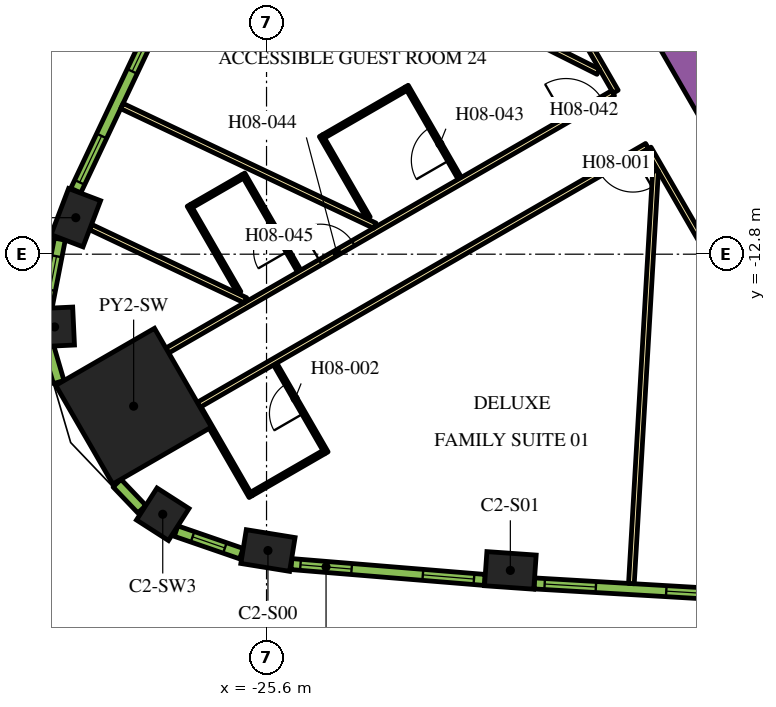
"""IFC4 building model, lengths in metres.
Left out: names, types, materials, properties, quantities, classifications, styles, units other than length and angle.
Written with IfcOpenShell. Run it as: python <this file> out.ifc"""

import sys

from ifc_helpers import new_model, si_unit, direction, frame, frame_2d, origin, origin_2d, place, context, subcontext, project, spatial, rectangle, extrude, element, fill, save


model = new_model("IFC4")
c1 = context("Model", 3, precision=1e-05, world=origin(), true_north=direction((0.0, 1.0)))
c2 = subcontext(c1, "Body", "Model", "MODEL_VIEW")
j1 = project(units=[si_unit("LENGTHUNIT", "METRE"), si_unit("PLANEANGLEUNIT", "RADIAN")], contexts=[c1])
p1 = place(None, origin())
s1 = spatial("IfcSite", under=j1, at=p1, CompositionType="ELEMENT")
p2 = place(p1, origin())
s2 = spatial("IfcBuilding", under=s1, at=p2, CompositionType="ELEMENT")
p3 = place(p2, frame((0.0, 0.0, 107.1)))
s3 = spatial("IfcBuildingStorey", under=s2, at=p3, CompositionType="ELEMENT", Elevation=107.1)
p4 = place(p3, frame((-29.097, -16.799, 0.0), z_axis=(0.0, 0.0, 1.0), x_axis=(-0.866025403784, -0.5, 0.0)))
e1 = element("IfcColumn", 1, at=p4, inside=s3, PredefinedType="COLUMN", context=c2, shape_type="SweptSolid", body=[
    extrude(rectangle(XDim=3.0, YDim=3.0, at=origin_2d()), origin(), (0.0, 0.0, 1.0), 3.9),
])
for number, where, z_axis, x_axis in (
    (2, (-25.563, -20.597, 0.0), (0.0, 0.0, 1.0), (0.987, -0.159, 0.0)),
    (3, (-19.184, -21.12, 0.0), (0.0, 0.0, 1.0), (0.998, -0.07, 0.0)),
    (4, (-30.619, -11.839, 0.0), (0.0, 0.0, 1.0), (-0.355, -0.935, 0.0)),
):
    element("IfcColumn", number, at=place(p3, frame(where, z_axis=z_axis, x_axis=x_axis)), inside=s3, PredefinedType="COLUMN", context=c2, shape_type="SweptSolid", body=[
        extrude(rectangle(XDim=1.3, YDim=0.9, at=origin_2d()), origin(), (0.0, 0.0, 1.0), 3.9),
    ])
for number, where, z_axis, x_axis in (
    (5, (-31.177, -14.714, 0.0), (0.0, 0.0, 1.0), (0.047, -0.999, 0.0)),
    (6, (-28.331, -19.643, 0.0), (0.0, 0.0, 1.0), (0.842, -0.54, 0.0)),
):
    element("IfcColumn", number, at=place(p3, frame(where, z_axis=z_axis, x_axis=x_axis)), inside=s3, PredefinedType="COLUMN", context=c2, shape_type="SweptSolid", body=[
        extrude(rectangle(XDim=1.0, YDim=1.0, at=origin_2d()), origin(), (0.0, 0.0, 1.0), 3.9),
    ])
p5 = place(p3, frame((-12.134, -11.883, 0.0), z_axis=(0.0, 0.0, 1.0), x_axis=(-0.500005339912, 0.866022320763, 0.0)))
e7 = element("IfcWall", 7, at=p5, inside=s3, PredefinedType="SOLIDWALL", context=c2, shape_type="SweptSolid", body=[
    extrude(rectangle(XDim=9.488, YDim=0.9, at=frame_2d((4.744, 0.0))), origin(), (0.0, 0.0, 1.0), 3.9),
])
p6 = place(p3, frame((-12.885, -9.431, 0.0), z_axis=(0.0, 0.0, 1.0), x_axis=(-0.500020560727, 0.866013532718, 0.0)))
e8 = element("IfcWall", 8, at=p6, inside=s3, PredefinedType="SOLIDWALL", context=c2, shape_type="SweptSolid", body=[
    extrude(rectangle(XDim=3.45, YDim=0.25, at=frame_2d((1.725, 0.0))), origin(), (0.0, 0.0, 1.0), 3.9),
])
p7 = place(p3, frame((-16.412, -8.523, 0.0), z_axis=(0.0, 0.0, 1.0), x_axis=(-0.500001929737, 0.866024289647, 0.0)))
e9 = element("IfcWall", 9, at=p7, inside=s3, PredefinedType="PARTITIONING", context=c2, shape_type="SweptSolid", body=[
    extrude(rectangle(XDim=5.268, YDim=0.15, at=frame_2d((2.634, 0.0))), origin(), (0.0, 0.0, 1.0), 2.75),
])
p8 = place(p3, frame((-28.211, -15.335, 0.0), z_axis=(0.0, 0.0, 1.0), x_axis=(0.866025884867, 0.49999916674, 0.0)))
e10 = element("IfcWall", 10, at=p8, inside=s3, PredefinedType="PARTITIONING", context=c2, shape_type="SweptSolid", body=[
    extrude(rectangle(XDim=13.543, YDim=0.15, at=frame_2d((6.772, 0.0))), origin(), (0.0, 0.0, 1.0), 2.75),
])
p9 = place(p8, frame((12.114, 0.0, 0.0)))
e11 = element("IfcOpeningElement", 11, at=p9, cuts=e10, PredefinedType="OPENING", context=c2, shape_type="SweptSolid", body=[
    extrude(rectangle(XDim=1.1, YDim=2.1, at=frame_2d((0.55, 1.05))), frame((0.0, 0.085, 0.0), z_axis=(0.0, -1.0, 0.0), x_axis=(1.0, 0.0, 0.0)), (0.0, 0.0, 1.0), 0.17),
])
p10 = place(p8, frame((4.65, 0.0, 0.0)))
e12 = element("IfcOpeningElement", 12, at=p10, cuts=e10, PredefinedType="OPENING", context=c2, shape_type="SweptSolid", body=[
    extrude(rectangle(XDim=1.0, YDim=2.1, at=frame_2d((0.5, 1.05))), frame((0.0, 0.085, 0.0), z_axis=(0.0, -1.0, 0.0), x_axis=(1.0, 0.0, 0.0)), (0.0, 0.0, 1.0), 0.17),
])
p11 = place(p3, frame((-15.587, -9.952, 0.0), z_axis=(0.0, 0.0, 1.0), x_axis=(-0.866017869832, -0.500013048961, 0.0)))
e13 = element("IfcWall", 13, at=p11, inside=s3, PredefinedType="PARTITIONING", context=c2, shape_type="SweptSolid", body=[
    extrude(rectangle(XDim=13.624, YDim=0.15, at=frame_2d((6.812, 0.0))), origin(), (0.0, 0.0, 1.0), 2.75),
])
p12 = place(p11, frame((0.427, 0.0, 0.0)))
e14 = element("IfcOpeningElement", 14, at=p12, cuts=e13, PredefinedType="OPENING", context=c2, shape_type="SweptSolid", body=[
    extrude(rectangle(XDim=1.0, YDim=2.1, at=frame_2d((0.5, 1.05))), frame((0.0, 0.085, 0.0), z_axis=(0.0, -1.0, 0.0), x_axis=(1.0, 0.0, 0.0)), (0.0, 0.0, 1.0), 0.17),
])
p13 = place(p3, frame((-12.918, -14.575, 0.0), z_axis=(0.0, 0.0, 1.0), x_axis=(-0.500009150678, 0.866020120573, 0.0)))
e15 = element("IfcWall", 15, at=p13, inside=s3, PredefinedType="PARTITIONING", context=c2, shape_type="SweptSolid", body=[
    extrude(rectangle(XDim=5.258, YDim=0.15, at=frame_2d((2.629, 0.0))), origin(), (0.0, 0.0, 1.0), 2.75),
])
p14 = place(p3, frame((-30.231, -12.085, 0.0), z_axis=(0.0, 0.0, 1.0), x_axis=(0.904001132572, -0.427530060122, 0.0)))
e16 = element("IfcWall", 16, at=p14, inside=s3, PredefinedType="PARTITIONING", context=c2, shape_type="SweptSolid", body=[
    extrude(rectangle(XDim=4.51, YDim=0.15, at=frame_2d((2.255, 0.0))), origin(), (0.0, 0.0, 1.0), 2.75),
])
p15 = place(p3, frame((-29.406, -8.901, 0.0), z_axis=(0.0, 0.0, 1.0), x_axis=(0.904002363742, -0.427527456836, 0.0)))
e17 = element("IfcWall", 17, at=p15, inside=s3, PredefinedType="PARTITIONING", context=c2, shape_type="SweptSolid", body=[
    extrude(rectangle(XDim=7.362, YDim=0.15, at=frame_2d((3.681, 0.0))), origin(), (0.0, 0.0, 1.0), 2.75),
])
p16 = place(p3, frame((-26.591, -3.122, 0.0), z_axis=(0.0, 0.0, 1.0), x_axis=(0.893766213273, -0.448533115847, 0.0)))
e18 = element("IfcWall", 18, at=p16, inside=s3, PredefinedType="PARTITIONING", context=c2, shape_type="SweptSolid", body=[
    extrude(rectangle(XDim=10.875, YDim=0.15, at=frame_2d((5.438, 0.0))), origin(), (0.0, 0.0, 1.0), 2.75),
])
p17 = place(p3, frame((-15.999, -21.467, 0.0), z_axis=(0.0, 0.0, 1.0), x_axis=(0.058411453297, 0.998292593443, 0.0)))
e19 = element("IfcWall", 19, at=p17, inside=s3, PredefinedType="PARTITIONING", context=c2, shape_type="SweptSolid", body=[
    extrude(rectangle(XDim=10.875, YDim=0.15, at=frame_2d((5.438, 0.0))), origin(), (0.0, 0.0, 1.0), 2.75),
])
p18 = place(p3, frame((-24.024, -18.027, 0.0), z_axis=(0.0, 0.0, 1.0), x_axis=(-0.4999416173, 0.866059108428, 0.0)))
e20 = element("IfcWall", 20, at=p18, inside=s3, PredefinedType="PARTITIONING", context=c2, shape_type="SweptSolid", body=[
    extrude(rectangle(XDim=2.7, YDim=0.1, at=frame_2d((1.35, 0.0))), origin(), (0.0, 0.0, 1.0), 2.75),
])
p19 = place(p18, frame((1.2, 0.0, 0.0)))
e21 = element("IfcOpeningElement", 21, at=p19, cuts=e20, PredefinedType="OPENING", context=c2, shape_type="SweptSolid", body=[
    extrude(rectangle(XDim=0.9, YDim=2.1, at=frame_2d((0.45, 1.05))), frame((0.0, 0.06, 0.0), z_axis=(0.0, -1.0, 0.0), x_axis=(1.0, 0.0, 0.0)), (0.0, 0.0, 1.0), 0.12),
])
p20 = place(p3, frame((-24.092, -18.009, 0.0), z_axis=(0.0, 0.0, 1.0), x_axis=(-0.866083962871, -0.499898558967, 0.0)))
e22 = element("IfcWall", 22, at=p20, inside=s3, PredefinedType="PARTITIONING", context=c2, shape_type="SweptSolid", body=[
    extrude(rectangle(XDim=2.2, YDim=0.1, at=frame_2d((1.1, 0.0))), origin(), (0.0, 0.0, 1.0), 2.75),
])
p21 = place(p3, frame((-27.365, -16.839, 0.0), z_axis=(0.0, 0.0, 1.0), x_axis=(0.50000943426, -0.866019956843, 0.0)))
e23 = element("IfcWall", 23, at=p21, inside=s3, PredefinedType="PARTITIONING", context=c2, shape_type="SweptSolid", body=[
    extrude(rectangle(XDim=2.7, YDim=0.1, at=frame_2d((1.35, 0.0))), origin(), (0.0, 0.0, 1.0), 2.75),
])
p22 = place(p3, frame((-20.515, -10.805, 0.0), z_axis=(0.0, 0.0, 1.0), x_axis=(-0.49994636267, 0.866056369097, 0.0)))
e24 = element("IfcWall", 24, at=p22, inside=s3, PredefinedType="PARTITIONING", context=c2, shape_type="SweptSolid", body=[
    extrude(rectangle(XDim=2.8, YDim=0.1, at=frame_2d((1.4, 0.0))), origin(), (0.0, 0.0, 1.0), 2.75),
])
p23 = place(p22, frame((0.55, 0.0, 0.0)))
e25 = element("IfcOpeningElement", 25, at=p23, cuts=e24, PredefinedType="OPENING", context=c2, shape_type="SweptSolid", body=[
    extrude(rectangle(XDim=1.0, YDim=2.1, at=frame_2d((0.5, 1.05))), frame((0.0, 0.06, 0.0), z_axis=(0.0, -1.0, 0.0), x_axis=(1.0, 0.0, 0.0)), (0.0, 0.0, 1.0), 0.12),
])
for number, where, z_axis, x_axis in (
    (26, (-21.933, -8.448, 0.0), (0.0, 0.0, 1.0), (-0.866, -0.5, 0.0)),
    (27, (-22.916, -11.845, 0.0), (0.0, 0.0, 1.0), (-0.5, 0.866, 0.0)),
):
    element("IfcWall", number, at=place(p3, frame(where, z_axis=z_axis, x_axis=x_axis)), inside=s3, PredefinedType="PARTITIONING", context=c2, shape_type="SweptSolid", body=[
        extrude(rectangle(XDim=2.5, YDim=0.1, at=frame_2d((1.25, 0.0))), origin(), (0.0, 0.0, 1.0), 2.75),
    ])
p24 = place(p3, frame((-24.74, -13.244, 0.0), z_axis=(0.0, 0.0, 1.0), x_axis=(-0.500037662692, 0.866003658127, 0.0)))
e28 = element("IfcWall", 28, at=p24, inside=s3, PredefinedType="PARTITIONING", context=c2, shape_type="SweptSolid", body=[
    extrude(rectangle(XDim=2.95, YDim=0.1, at=frame_2d((1.475, 0.0))), origin(), (0.0, 0.0, 1.0), 2.75),
])
p25 = place(p24, frame((0.6, 0.0, 0.0)))
e29 = element("IfcOpeningElement", 29, at=p25, cuts=e28, PredefinedType="OPENING", context=c2, shape_type="SweptSolid", body=[
    extrude(rectangle(XDim=0.9, YDim=2.1, at=frame_2d((0.45, 1.05))), frame((0.0, 0.06, 0.0), z_axis=(0.0, -1.0, 0.0), x_axis=(1.0, 0.0, 0.0)), (0.0, 0.0, 1.0), 0.12),
])
p26 = place(p3, frame((-26.233, -10.758, 0.0), z_axis=(0.0, 0.0, 1.0), x_axis=(-0.866043940782, -0.499967891604, 0.0)))
e30 = element("IfcWall", 30, at=p26, inside=s3, PredefinedType="PARTITIONING", context=c2, shape_type="SweptSolid", body=[
    extrude(rectangle(XDim=1.55, YDim=0.1, at=frame_2d((0.775, 0.0))), origin(), (0.0, 0.0, 1.0), 2.75),
])
p27 = place(p3, frame((-26.319, -13.81, 0.0), z_axis=(0.0, 0.0, 1.0), x_axis=(-0.499953715521, 0.866052124492, 0.0)))
e31 = element("IfcWall", 31, at=p27, inside=s3, PredefinedType="PARTITIONING", context=c2, shape_type="SweptSolid", body=[
    extrude(rectangle(XDim=2.65, YDim=0.1, at=frame_2d((1.325, 0.0))), origin(), (0.0, 0.0, 1.0), 2.75),
])
p28 = place(p3, frame((-24.946, -20.954, 0.0), z_axis=(0.0, 0.0, 1.0), x_axis=(0.99665273362, -0.081751627308, 0.0)))
e32 = element("IfcWall", 32, at=p28, inside=s3, PredefinedType="SOLIDWALL", context=c2, shape_type="SweptSolid", body=[
    extrude(rectangle(XDim=5.107, YDim=0.29, at=frame_2d((2.553, 0.0))), origin(), (0.0, 0.0, 1.0), 3.65),
])
p29 = place(p28, frame((0.24, 0.0, 0.9)))
e33 = element("IfcOpeningElement", 33, at=p29, cuts=e32, PredefinedType="OPENING", context=c2, shape_type="SweptSolid", body=[
    extrude(rectangle(XDim=1.35, YDim=2.15, at=frame_2d((0.675, 1.075))), frame((0.0, 0.155, 0.0), z_axis=(0.0, -1.0, 0.0), x_axis=(1.0, 0.0, 0.0)), (0.0, 0.0, 1.0), 0.31),
])
p30 = place(p28, frame((3.471, 0.0, 0.9)))
e34 = element("IfcOpeningElement", 34, at=p30, cuts=e32, PredefinedType="OPENING", context=c2, shape_type="SweptSolid", body=[
    extrude(rectangle(XDim=1.35, YDim=2.15, at=frame_2d((0.675, 1.075))), frame((0.0, 0.155, 0.0), z_axis=(0.0, -1.0, 0.0), x_axis=(1.0, 0.0, 0.0)), (0.0, 0.0, 1.0), 0.31),
])
p31 = place(p3, frame((-18.553, -21.463, 0.0), z_axis=(0.0, 0.0, 1.0), x_axis=(0.998290511436, -0.058447025388, 0.0)))
e35 = element("IfcWall", 35, at=p31, inside=s3, PredefinedType="SOLIDWALL", context=c2, shape_type="SweptSolid", body=[
    extrude(rectangle(XDim=5.1, YDim=0.29, at=frame_2d((2.55, 0.0))), origin(), (0.0, 0.0, 1.0), 3.65),
])
p32 = place(p31, frame((0.273, 0.0, 0.9)))
e36 = element("IfcOpeningElement", 36, at=p32, cuts=e35, PredefinedType="OPENING", context=c2, shape_type="SweptSolid", body=[
    extrude(rectangle(XDim=1.35, YDim=2.15, at=frame_2d((0.675, 1.075))), frame((0.0, 0.155, 0.0), z_axis=(0.0, -1.0, 0.0), x_axis=(1.0, 0.0, 0.0)), (0.0, 0.0, 1.0), 0.31),
])
p33 = place(p31, frame((3.478, 0.0, 0.9)))
e37 = element("IfcOpeningElement", 37, at=p33, cuts=e35, PredefinedType="OPENING", context=c2, shape_type="SweptSolid", body=[
    extrude(rectangle(XDim=1.35, YDim=2.15, at=frame_2d((0.675, 1.075))), frame((0.0, 0.155, 0.0), z_axis=(0.0, -1.0, 0.0), x_axis=(1.0, 0.0, 0.0)), (0.0, 0.0, 1.0), 0.31),
])
p34 = place(p3, frame((-28.436, -6.511, 0.0), z_axis=(0.0, 0.0, 1.0), x_axis=(-0.427543726596, -0.903994669148, 0.0)))
e38 = element("IfcWall", 38, at=p34, inside=s3, PredefinedType="SOLIDWALL", context=c2, shape_type="SweptSolid", body=[
    extrude(rectangle(XDim=5.107, YDim=0.29, at=frame_2d((2.553, 0.0))), origin(), (0.0, 0.0, 1.0), 3.65),
])
p35 = place(p34, frame((0.285, 0.0, 0.9)))
e39 = element("IfcOpeningElement", 39, at=p35, cuts=e38, PredefinedType="OPENING", context=c2, shape_type="SweptSolid", body=[
    extrude(rectangle(XDim=1.35, YDim=2.15, at=frame_2d((0.675, 1.075))), frame((0.0, 0.155, 0.0), z_axis=(0.0, -1.0, 0.0), x_axis=(1.0, 0.0, 0.0)), (0.0, 0.0, 1.0), 0.31),
])
p36 = place(p34, frame((3.516, 0.0, 0.9)))
e40 = element("IfcOpeningElement", 40, at=p36, cuts=e38, PredefinedType="OPENING", context=c2, shape_type="SweptSolid", body=[
    extrude(rectangle(XDim=1.35, YDim=2.15, at=frame_2d((0.675, 1.075))), frame((0.0, 0.155, 0.0), z_axis=(0.0, -1.0, 0.0), x_axis=(1.0, 0.0, 0.0)), (0.0, 0.0, 1.0), 0.31),
])
p37 = place(p3, frame((-31.039, -12.403, 0.0), z_axis=(0.0, 0.0, 1.0), x_axis=(-0.190409913989, -0.981704672829, 0.0)))
e41 = element("IfcWall", 41, at=p37, inside=s3, PredefinedType="SOLIDWALL", context=c2, shape_type="SweptSolid", body=[
    extrude(rectangle(XDim=1.819, YDim=0.29, at=frame_2d((0.91, 0.0))), origin(), (0.0, 0.0, 1.0), 3.65),
])
p38 = place(p37, frame((0.46, 0.0, 0.9)))
e42 = element("IfcOpeningElement", 42, at=p38, cuts=e41, PredefinedType="OPENING", context=c2, shape_type="SweptSolid", body=[
    extrude(rectangle(XDim=0.9, YDim=2.15, at=frame_2d((0.45, 1.075))), frame((0.0, 0.155, 0.0), z_axis=(0.0, -1.0, 0.0), x_axis=(1.0, 0.0, 0.0)), (0.0, 0.0, 1.0), 0.31),
])
p39 = place(p3, frame((-31.336, -15.256, 0.0), z_axis=(0.0, 0.0, 1.0), x_axis=(0.281454582132, -0.95957455062, 0.0)))
e43 = element("IfcWall", 43, at=p39, inside=s3, PredefinedType="SOLIDWALL", context=c2, shape_type="SweptSolid", body=[
    extrude(rectangle(XDim=0.947, YDim=0.29, at=frame_2d((0.474, 0.0))), origin(), (0.0, 0.0, 1.0), 3.65),
])
p40 = place(p3, frame((-29.534, -18.824, 0.0), z_axis=(0.0, 0.0, 1.0), x_axis=(0.690414427296, -0.723414071319, 0.0)))
e44 = element("IfcWall", 44, at=p40, inside=s3, PredefinedType="SOLIDWALL", context=c2, shape_type="SweptSolid", body=[
    extrude(rectangle(XDim=0.947, YDim=0.29, at=frame_2d((0.474, 0.0))), origin(), (0.0, 0.0, 1.0), 3.65),
])
p41 = place(p3, frame((-27.981, -20.086, 0.0), z_axis=(0.0, 0.0, 1.0), x_axis=(0.945385815453, -0.325953462844, 0.0)))
e45 = element("IfcWall", 45, at=p41, inside=s3, PredefinedType="SOLIDWALL", context=c2, shape_type="SweptSolid", body=[
    extrude(rectangle(XDim=1.819, YDim=0.29, at=frame_2d((0.91, 0.0))), origin(), (0.0, 0.0, 1.0), 3.65),
])
p42 = place(p41, frame((0.46, 0.0, 0.9)))
e46 = element("IfcOpeningElement", 46, at=p42, cuts=e45, PredefinedType="OPENING", context=c2, shape_type="SweptSolid", body=[
    extrude(rectangle(XDim=0.9, YDim=2.15, at=frame_2d((0.45, 1.075))), frame((0.0, 0.155, 0.0), z_axis=(0.0, -1.0, 0.0), x_axis=(1.0, 0.0, 0.0)), (0.0, 0.0, 1.0), 0.31),
])
p43 = place(p12, origin())
e47 = element("IfcDoor", 47, at=p43, inside=s3, OperationType="SINGLE_SWING_LEFT", PredefinedType="DOOR", context=c2, shape_type="SweptSolid", body=[
    extrude(rectangle(XDim=1.0, YDim=2.1, at=frame_2d((0.5, 1.05))), frame((0.0, 0.025, 0.0), z_axis=(0.0, -1.0, 0.0), x_axis=(1.0, 0.0, 0.0)), (0.0, 0.0, 1.0), 0.05),
])
fill(e14, e47)
p44 = place(p19, origin())
e48 = element("IfcDoor", 48, at=p44, inside=s3, OperationType="SINGLE_SWING_LEFT", PredefinedType="DOOR", context=c2, shape_type="SweptSolid", body=[
    extrude(rectangle(XDim=0.9, YDim=2.1, at=frame_2d((0.45, 1.05))), frame((0.0, 0.025, 0.0), z_axis=(0.0, -1.0, 0.0), x_axis=(1.0, 0.0, 0.0)), (0.0, 0.0, 1.0), 0.05),
])
fill(e21, e48)
p45 = place(p9, origin())
e49 = element("IfcDoor", 49, at=p45, inside=s3, OperationType="SINGLE_SWING_RIGHT", PredefinedType="DOOR", context=c2, shape_type="SweptSolid", body=[
    extrude(rectangle(XDim=1.1, YDim=2.1, at=frame_2d((0.55, 1.05))), frame((0.0, 0.025, 0.0), z_axis=(0.0, -1.0, 0.0), x_axis=(1.0, 0.0, 0.0)), (0.0, 0.0, 1.0), 0.05),
])
fill(e11, e49)
p46 = place(p23, origin())
e50 = element("IfcDoor", 50, at=p46, inside=s3, OperationType="SINGLE_SWING_RIGHT", PredefinedType="DOOR", context=c2, shape_type="SweptSolid", body=[
    extrude(rectangle(XDim=1.0, YDim=2.1, at=frame_2d((0.5, 1.05))), frame((0.0, 0.025, 0.0), z_axis=(0.0, -1.0, 0.0), x_axis=(1.0, 0.0, 0.0)), (0.0, 0.0, 1.0), 0.05),
])
fill(e25, e50)
p47 = place(p10, origin())
e51 = element("IfcDoor", 51, at=p47, inside=s3, OperationType="SINGLE_SWING_RIGHT", PredefinedType="DOOR", context=c2, shape_type="SweptSolid", body=[
    extrude(rectangle(XDim=1.0, YDim=2.1, at=frame_2d((0.5, 1.05))), frame((0.0, 0.025, 0.0), z_axis=(0.0, -1.0, 0.0), x_axis=(1.0, 0.0, 0.0)), (0.0, 0.0, 1.0), 0.05),
])
fill(e12, e51)
p48 = place(p25, origin())
e52 = element("IfcDoor", 52, at=p48, inside=s3, OperationType="SINGLE_SWING_LEFT", PredefinedType="DOOR", context=c2, shape_type="SweptSolid", body=[
    extrude(rectangle(XDim=0.9, YDim=2.1, at=frame_2d((0.45, 1.05))), frame((0.0, 0.025, 0.0), z_axis=(0.0, -1.0, 0.0), x_axis=(1.0, 0.0, 0.0)), (0.0, 0.0, 1.0), 0.05),
])
fill(e29, e52)
p49 = place(p29, origin())
e53 = element("IfcWindow", 53, at=p49, inside=s3, PartitioningType="DOUBLE_PANEL_VERTICAL", PredefinedType="WINDOW", context=c2, shape_type="SweptSolid", body=[
    extrude(rectangle(XDim=1.35, YDim=2.15, at=frame_2d((0.675, 1.075))), frame((0.0, 0.015, 0.0), z_axis=(0.0, -1.0, 0.0), x_axis=(1.0, 0.0, 0.0)), (0.0, 0.0, 1.0), 0.06),
])
fill(e33, e53)
p50 = place(p30, origin())
e54 = element("IfcWindow", 54, at=p50, inside=s3, PartitioningType="DOUBLE_PANEL_VERTICAL", PredefinedType="WINDOW", context=c2, shape_type="SweptSolid", body=[
    extrude(rectangle(XDim=1.35, YDim=2.15, at=frame_2d((0.675, 1.075))), frame((0.0, 0.015, 0.0), z_axis=(0.0, -1.0, 0.0), x_axis=(1.0, 0.0, 0.0)), (0.0, 0.0, 1.0), 0.06),
])
fill(e34, e54)
p51 = place(p32, origin())
e55 = element("IfcWindow", 55, at=p51, inside=s3, PartitioningType="DOUBLE_PANEL_VERTICAL", PredefinedType="WINDOW", context=c2, shape_type="SweptSolid", body=[
    extrude(rectangle(XDim=1.35, YDim=2.15, at=frame_2d((0.675, 1.075))), frame((0.0, 0.015, 0.0), z_axis=(0.0, -1.0, 0.0), x_axis=(1.0, 0.0, 0.0)), (0.0, 0.0, 1.0), 0.06),
])
fill(e36, e55)
p52 = place(p33, origin())
e56 = element("IfcWindow", 56, at=p52, inside=s3, PartitioningType="DOUBLE_PANEL_VERTICAL", PredefinedType="WINDOW", context=c2, shape_type="SweptSolid", body=[
    extrude(rectangle(XDim=1.35, YDim=2.15, at=frame_2d((0.675, 1.075))), frame((0.0, 0.015, 0.0), z_axis=(0.0, -1.0, 0.0), x_axis=(1.0, 0.0, 0.0)), (0.0, 0.0, 1.0), 0.06),
])
fill(e37, e56)
p53 = place(p35, origin())
e57 = element("IfcWindow", 57, at=p53, inside=s3, PartitioningType="DOUBLE_PANEL_VERTICAL", PredefinedType="WINDOW", context=c2, shape_type="SweptSolid", body=[
    extrude(rectangle(XDim=1.35, YDim=2.15, at=frame_2d((0.675, 1.075))), frame((0.0, 0.015, 0.0), z_axis=(0.0, -1.0, 0.0), x_axis=(1.0, 0.0, 0.0)), (0.0, 0.0, 1.0), 0.06),
])
fill(e39, e57)
p54 = place(p36, origin())
e58 = element("IfcWindow", 58, at=p54, inside=s3, PartitioningType="DOUBLE_PANEL_VERTICAL", PredefinedType="WINDOW", context=c2, shape_type="SweptSolid", body=[
    extrude(rectangle(XDim=1.35, YDim=2.15, at=frame_2d((0.675, 1.075))), frame((0.0, 0.015, 0.0), z_axis=(0.0, -1.0, 0.0), x_axis=(1.0, 0.0, 0.0)), (0.0, 0.0, 1.0), 0.06),
])
fill(e40, e58)
p55 = place(p38, origin())
e59 = element("IfcWindow", 59, at=p55, inside=s3, PartitioningType="SINGLE_PANEL", PredefinedType="WINDOW", context=c2, shape_type="SweptSolid", body=[
    extrude(rectangle(XDim=0.9, YDim=2.15, at=frame_2d((0.45, 1.075))), frame((0.0, 0.015, 0.0), z_axis=(0.0, -1.0, 0.0), x_axis=(1.0, 0.0, 0.0)), (0.0, 0.0, 1.0), 0.06),
])
fill(e42, e59)
p56 = place(p42, origin())
e60 = element("IfcWindow", 60, at=p56, inside=s3, PartitioningType="SINGLE_PANEL", PredefinedType="WINDOW", context=c2, shape_type="SweptSolid", body=[
    extrude(rectangle(XDim=0.9, YDim=2.15, at=frame_2d((0.45, 1.075))), frame((0.0, 0.015, 0.0), z_axis=(0.0, -1.0, 0.0), x_axis=(1.0, 0.0, 0.0)), (0.0, 0.0, 1.0), 0.06),
])
fill(e46, e60)
save(model, sys.argv[1])
